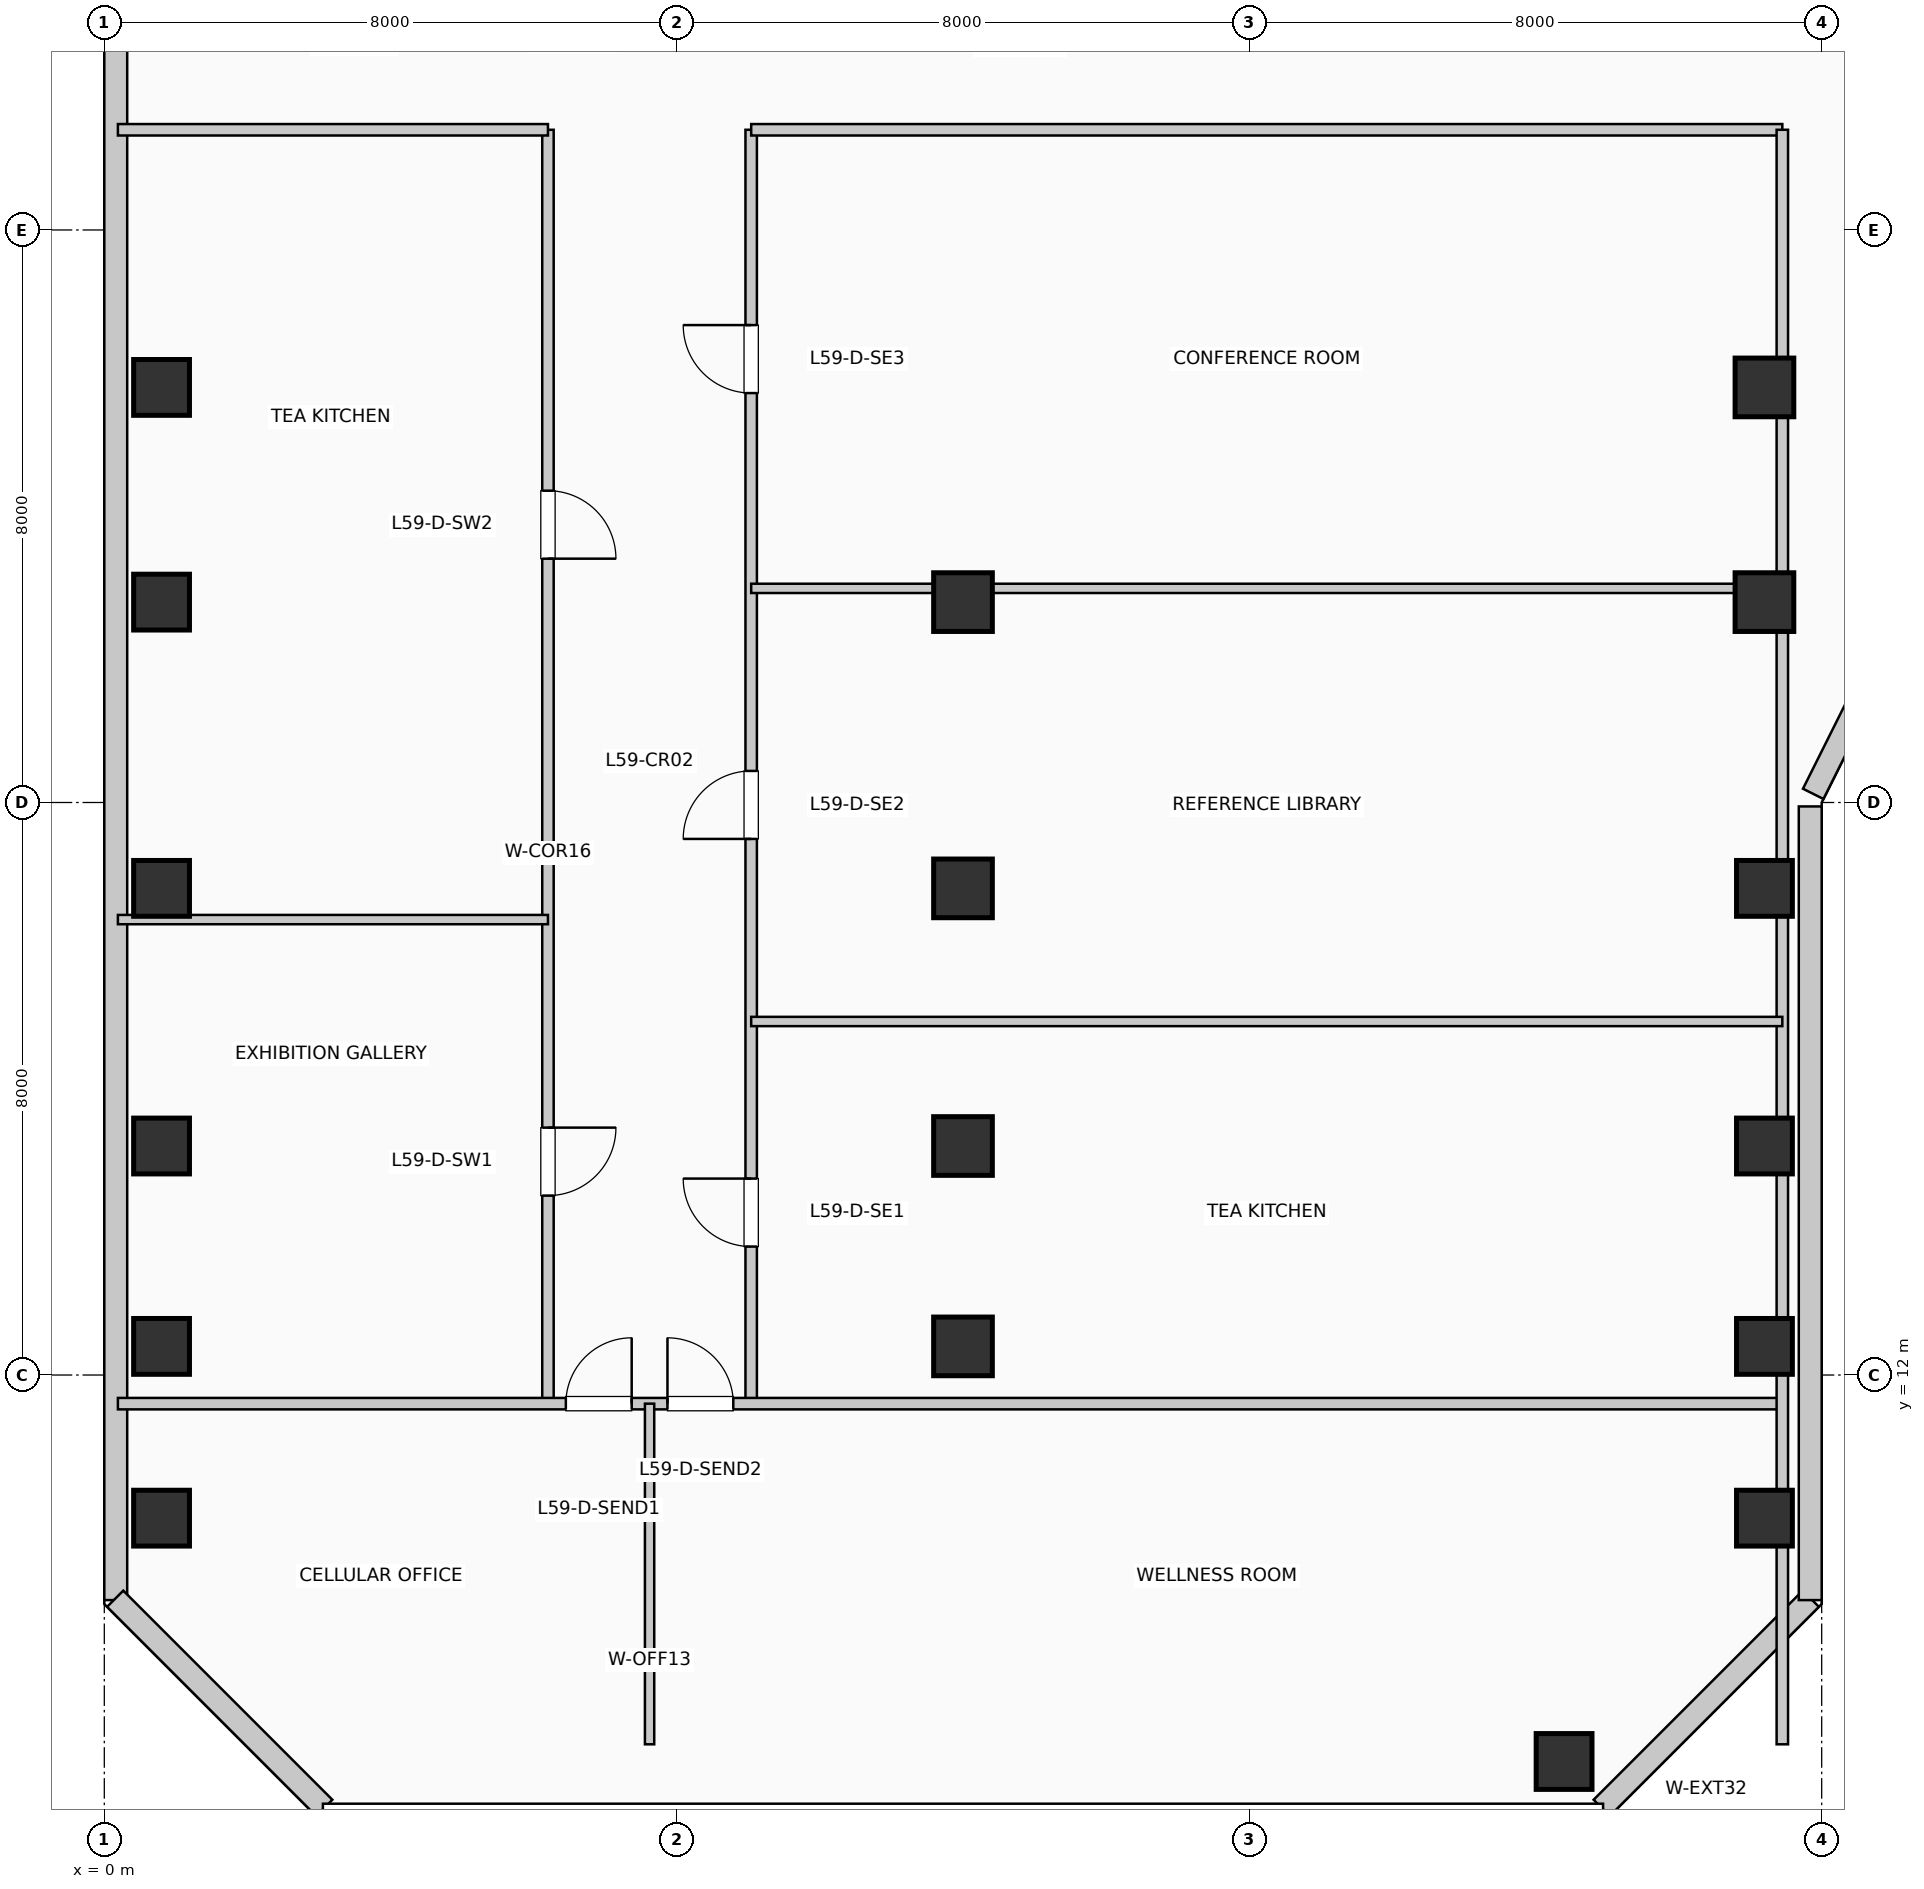
"""IFC4 building model, lengths in metres.
Left out: names, types, materials, properties, quantities, classifications, styles, units other than length and angle.
Written with IfcOpenShell. Run it as: python <this file> out.ifc"""

import sys

from ifc_helpers import new_model, si_unit, direction, frame, frame_2d, origin, origin_2d, place, context, subcontext, project, spatial, rectangle, extrude, element, fill, save


model = new_model("IFC4")
c1 = context("Model", 3, precision=1e-05, world=origin(), true_north=direction((0.0, 1.0)))
c2 = subcontext(c1, "Body", "Model", "MODEL_VIEW")
j1 = project(units=[si_unit("LENGTHUNIT", "METRE"), si_unit("PLANEANGLEUNIT", "RADIAN")], contexts=[c1])
p1 = place(None, origin())
s1 = spatial("IfcSite", under=j1, at=p1, CompositionType="ELEMENT")
p2 = place(p1, origin())
s2 = spatial("IfcBuilding", under=s1, at=p2, CompositionType="ELEMENT")
p3 = place(p2, frame((0.0, 0.0, 243.54)))
s3 = spatial("IfcBuildingStorey", under=s2, at=p3, CompositionType="ELEMENT", Elevation=243.54)
for number, where, z_axis, x_axis in (
    (1, (0.8, 10.0, 0.0), (0.0, 0.0, 1.0), (1.0, 0.0, 0.0)),
    (2, (0.8, 12.4, 0.0), (0.0, 0.0, 1.0), (1.0, 0.0, 0.0)),
    (3, (0.8, 15.2, 0.0), (0.0, 0.0, 1.0), (1.0, 0.0, 0.0)),
    (4, (0.8, 18.8, 0.0), (0.0, 0.0, 1.0), (1.0, 0.0, 0.0)),
    (5, (0.8, 22.8, 0.0), (0.0, 0.0, 1.0), (1.0, 0.0, 0.0)),
    (6, (0.8, 25.8, 0.0), (0.0, 0.0, 1.0), (1.0, 0.0, 0.0)),
):
    element("IfcColumn", number, at=place(p3, frame(where, z_axis=z_axis, x_axis=x_axis)), inside=s3, PredefinedType="COLUMN", context=c2, shape_type="SweptSolid", body=[
        extrude(rectangle(XDim=0.78, YDim=0.78, at=origin_2d()), origin(), (0.0, 0.0, 1.0), 3.96),
    ])
for number, where, z_axis, x_axis in (
    (7, (12.0, 12.4, 0.0), (0.0, 0.0, 1.0), (1.0, 0.0, 0.0)),
    (8, (12.0, 15.2, 0.0), (0.0, 0.0, 1.0), (1.0, 0.0, 0.0)),
    (9, (12.0, 18.8, 0.0), (0.0, 0.0, 1.0), (1.0, 0.0, 0.0)),
    (10, (12.0, 22.8, 0.0), (0.0, 0.0, 1.0), (1.0, 0.0, 0.0)),
):
    element("IfcColumn", number, at=place(p3, frame(where, z_axis=z_axis, x_axis=x_axis)), inside=s3, PredefinedType="COLUMN", context=c2, shape_type="SweptSolid", body=[
        extrude(rectangle(XDim=0.82, YDim=0.82, at=origin_2d()), origin(), (0.0, 0.0, 1.0), 3.96),
    ])
for number, where, z_axis, x_axis in (
    (11, (20.4, 6.6, 0.0), (0.0, 0.0, 1.0), (1.0, 0.0, 0.0)),
    (12, (23.2, 10.0, 0.0), (0.0, 0.0, 1.0), (1.0, 0.0, 0.0)),
    (13, (23.2, 12.4, 0.0), (0.0, 0.0, 1.0), (1.0, 0.0, 0.0)),
    (14, (23.2, 15.2, 0.0), (0.0, 0.0, 1.0), (1.0, 0.0, 0.0)),
    (15, (23.2, 18.8, 0.0), (0.0, 0.0, 1.0), (1.0, 0.0, 0.0)),
):
    element("IfcColumn", number, at=place(p3, frame(where, z_axis=z_axis, x_axis=x_axis)), inside=s3, PredefinedType="COLUMN", context=c2, shape_type="SweptSolid", body=[
        extrude(rectangle(XDim=0.78, YDim=0.78, at=origin_2d()), origin(), (0.0, 0.0, 1.0), 3.96),
    ])
for number, where, z_axis, x_axis in (
    (16, (23.2, 22.8, 0.0), (0.0, 0.0, 1.0), (1.0, 0.0, 0.0)),
    (17, (23.2, 25.8, 0.0), (0.0, 0.0, 1.0), (1.0, 0.0, 0.0)),
):
    element("IfcColumn", number, at=place(p3, frame(where, z_axis=z_axis, x_axis=x_axis)), inside=s3, PredefinedType="COLUMN", context=c2, shape_type="SweptSolid", body=[
        extrude(rectangle(XDim=0.82, YDim=0.82, at=origin_2d()), origin(), (0.0, 0.0, 1.0), 3.96),
    ])
p4 = place(p3, frame((20.926, 5.952, 0.0), z_axis=(0.0, 0.0, 1.0), x_axis=(0.707077242712, 0.707136318428, 0.0)))
e18 = element("IfcWall", 18, at=p4, inside=s3, PredefinedType="SOLIDWALL", context=c2, shape_type="SweptSolid", body=[
    extrude(rectangle(XDim=4.133, YDim=0.32, at=frame_2d((2.066, 0.0))), origin(), (0.0, 0.0, 1.0), 3.71),
])
p5 = place(p3, frame((23.84, 8.855, 0.0), z_axis=(0.0, 0.0, 1.0), x_axis=(0.0, 1.0, 0.0)))
e19 = element("IfcWall", 19, at=p5, inside=s3, PredefinedType="SOLIDWALL", context=c2, shape_type="SweptSolid", body=[
    extrude(rectangle(XDim=11.09, YDim=0.32, at=frame_2d((5.545, 0.0))), origin(), (0.0, 0.0, 1.0), 3.71),
])
p6 = place(p3, frame((23.882, 20.121, 0.0), z_axis=(0.0, 0.0, 1.0), x_axis=(0.447121734542, 0.894473115583, 0.0)))
e20 = element("IfcWall", 20, at=p6, inside=s3, PredefinedType="SOLIDWALL", context=c2, shape_type="SweptSolid", body=[
    extrude(rectangle(XDim=2.126, YDim=0.32, at=frame_2d((1.063, 0.0))), origin(), (0.0, 0.0, 1.0), 3.71),
])
p7 = place(p3, frame((0.16, 34.395, 0.0), z_axis=(0.0, 0.0, 1.0), x_axis=(0.0, -1.0, 0.0)))
e21 = element("IfcWall", 21, at=p7, inside=s3, PredefinedType="SOLIDWALL", context=c2, shape_type="SweptSolid", body=[
    extrude(rectangle(XDim=25.54, YDim=0.32, at=frame_2d((12.77, 0.0))), origin(), (0.0, 0.0, 1.0), 3.71),
])
p8 = place(p3, frame((0.152, 8.874, 0.0), z_axis=(0.0, 0.0, 1.0), x_axis=(0.707077242712, -0.707136318428, 0.0)))
e22 = element("IfcWall", 22, at=p8, inside=s3, PredefinedType="SOLIDWALL", context=c2, shape_type="SweptSolid", body=[
    extrude(rectangle(XDim=4.133, YDim=0.32, at=frame_2d((2.066, 0.0))), origin(), (0.0, 0.0, 1.0), 3.71),
])
p9 = place(p3, frame((6.2, 11.6, 0.0), z_axis=(0.0, 0.0, 1.0), x_axis=(0.0, 1.0, 0.0)))
e23 = element("IfcWall", 23, at=p9, inside=s3, PredefinedType="PARTITIONING", context=c2, shape_type="SweptSolid", body=[
    extrude(rectangle(XDim=17.8, YDim=0.16, at=frame_2d((8.9, 0.0))), origin(), (0.0, 0.0, 1.0), 3.71),
])
p10 = place(p9, frame((3.857, 0.0, 0.0), z_axis=(0.0, 0.0, 1.0), x_axis=(-1.0, 0.0, 0.0)))
e24 = element("IfcOpeningElement", 24, at=p10, cuts=e23, PredefinedType="OPENING", context=c2, shape_type="SweptSolid", body=[
    extrude(rectangle(XDim=0.95, YDim=2.15, at=frame_2d((0.475, 1.075))), frame((0.0, 0.09, 0.0), z_axis=(0.0, -1.0, 0.0), x_axis=(1.0, 0.0, 0.0)), (0.0, 0.0, 1.0), 0.18),
])
p11 = place(p9, frame((12.757, 0.0, 0.0), z_axis=(0.0, 0.0, 1.0), x_axis=(-1.0, 0.0, 0.0)))
e25 = element("IfcOpeningElement", 25, at=p11, cuts=e23, PredefinedType="OPENING", context=c2, shape_type="SweptSolid", body=[
    extrude(rectangle(XDim=0.95, YDim=2.15, at=frame_2d((0.475, 1.075))), frame((0.0, 0.09, 0.0), z_axis=(0.0, -1.0, 0.0), x_axis=(1.0, 0.0, 0.0)), (0.0, 0.0, 1.0), 0.18),
])
p12 = place(p3, frame((9.04, 11.6, 0.0), z_axis=(0.0, 0.0, 1.0), x_axis=(0.0, 1.0, 0.0)))
e26 = element("IfcWall", 26, at=p12, inside=s3, PredefinedType="PARTITIONING", context=c2, shape_type="SweptSolid", body=[
    extrude(rectangle(XDim=17.8, YDim=0.16, at=frame_2d((8.9, 0.0))), origin(), (0.0, 0.0, 1.0), 3.71),
])
p13 = place(p12, frame((2.195, 0.0, 0.0)))
e27 = element("IfcOpeningElement", 27, at=p13, cuts=e26, PredefinedType="OPENING", context=c2, shape_type="SweptSolid", body=[
    extrude(rectangle(XDim=0.95, YDim=2.15, at=frame_2d((0.475, 1.075))), frame((0.0, 0.09, 0.0), z_axis=(0.0, -1.0, 0.0), x_axis=(1.0, 0.0, 0.0)), (0.0, 0.0, 1.0), 0.18),
])
p14 = place(p12, frame((7.891, 0.0, 0.0)))
e28 = element("IfcOpeningElement", 28, at=p14, cuts=e26, PredefinedType="OPENING", context=c2, shape_type="SweptSolid", body=[
    extrude(rectangle(XDim=0.95, YDim=2.15, at=frame_2d((0.475, 1.075))), frame((0.0, 0.09, 0.0), z_axis=(0.0, -1.0, 0.0), x_axis=(1.0, 0.0, 0.0)), (0.0, 0.0, 1.0), 0.18),
])
p15 = place(p12, frame((14.121, 0.0, 0.0)))
e29 = element("IfcOpeningElement", 29, at=p15, cuts=e26, PredefinedType="OPENING", context=c2, shape_type="SweptSolid", body=[
    extrude(rectangle(XDim=0.95, YDim=2.15, at=frame_2d((0.475, 1.075))), frame((0.0, 0.09, 0.0), z_axis=(0.0, -1.0, 0.0), x_axis=(1.0, 0.0, 0.0)), (0.0, 0.0, 1.0), 0.18),
])
p16 = place(p3, frame((0.19, 11.6, 0.0), z_axis=(0.0, 0.0, 1.0), x_axis=(1.0, 0.0, 0.0)))
e30 = element("IfcWall", 30, at=p16, inside=s3, PredefinedType="PARTITIONING", context=c2, shape_type="SweptSolid", body=[
    extrude(rectangle(XDim=23.26, YDim=0.16, at=frame_2d((11.63, 0.0))), origin(), (0.0, 0.0, 1.0), 3.71),
])
p17 = place(p16, frame((6.26, 0.0, 0.0)))
e31 = element("IfcOpeningElement", 31, at=p17, cuts=e30, PredefinedType="OPENING", context=c2, shape_type="SweptSolid", body=[
    extrude(rectangle(XDim=0.92, YDim=2.1, at=frame_2d((0.46, 1.05))), frame((0.0, 0.09, 0.0), z_axis=(0.0, -1.0, 0.0), x_axis=(1.0, 0.0, 0.0)), (0.0, 0.0, 1.0), 0.18),
])
p18 = place(p16, frame((7.68, 0.0, 0.0)))
e32 = element("IfcOpeningElement", 32, at=p18, cuts=e30, PredefinedType="OPENING", context=c2, shape_type="SweptSolid", body=[
    extrude(rectangle(XDim=0.92, YDim=2.1, at=frame_2d((0.46, 1.05))), frame((0.0, 0.09, 0.0), z_axis=(0.0, -1.0, 0.0), x_axis=(1.0, 0.0, 0.0)), (0.0, 0.0, 1.0), 0.18),
])
p19 = place(p3, frame((0.19, 29.4, 0.0), z_axis=(0.0, 0.0, 1.0), x_axis=(1.0, 0.0, 0.0)))
e33 = element("IfcWall", 33, at=p19, inside=s3, PredefinedType="PARTITIONING", context=c2, shape_type="SweptSolid", body=[
    extrude(rectangle(XDim=6.01, YDim=0.16, at=frame_2d((3.005, 0.0))), origin(), (0.0, 0.0, 1.0), 3.365),
])
p20 = place(p3, frame((9.04, 29.4, 0.0), z_axis=(0.0, 0.0, 1.0), x_axis=(1.0, 0.0, 0.0)))
e34 = element("IfcWall", 34, at=p20, inside=s3, PredefinedType="PARTITIONING", context=c2, shape_type="SweptSolid", body=[
    extrude(rectangle(XDim=14.41, YDim=0.16, at=frame_2d((7.205, 0.0))), origin(), (0.0, 0.0, 1.0), 3.365),
])
p21 = place(p3, frame((23.45, 6.84, 0.0), z_axis=(0.0, 0.0, 1.0), x_axis=(0.0, 1.0, 0.0)))
e35 = element("IfcWall", 35, at=p21, inside=s3, PredefinedType="PARTITIONING", context=c2, shape_type="SweptSolid", body=[
    extrude(rectangle(XDim=22.56, YDim=0.16, at=frame_2d((11.28, 0.0))), origin(), (0.0, 0.0, 1.0), 3.095),
])
p22 = place(p3, frame((7.62, 6.84, 0.0), z_axis=(0.0, 0.0, 1.0), x_axis=(0.0, 1.0, 0.0)))
e36 = element("IfcWall", 36, at=p22, inside=s3, PredefinedType="PARTITIONING", context=c2, shape_type="SweptSolid", body=[
    extrude(rectangle(XDim=4.76, YDim=0.13, at=frame_2d((2.38, 0.0))), origin(), (0.0, 0.0, 1.0), 3.71),
])
p23 = place(p3, frame((0.19, 18.364, 0.0), z_axis=(0.0, 0.0, 1.0), x_axis=(1.0, 0.0, 0.0)))
e37 = element("IfcWall", 37, at=p23, inside=s3, PredefinedType="PARTITIONING", context=c2, shape_type="SweptSolid", body=[
    extrude(rectangle(XDim=6.01, YDim=0.13, at=frame_2d((3.005, 0.0))), origin(), (0.0, 0.0, 1.0), 3.095),
])
p24 = place(p3, frame((9.04, 16.94, 0.0), z_axis=(0.0, 0.0, 1.0), x_axis=(1.0, 0.0, 0.0)))
e38 = element("IfcWall", 38, at=p24, inside=s3, PredefinedType="PARTITIONING", context=c2, shape_type="SweptSolid", body=[
    extrude(rectangle(XDim=14.41, YDim=0.13, at=frame_2d((7.205, 0.0))), origin(), (0.0, 0.0, 1.0), 3.71),
])
p25 = place(p3, frame((9.04, 22.992, 0.0), z_axis=(0.0, 0.0, 1.0), x_axis=(1.0, 0.0, 0.0)))
e39 = element("IfcWall", 39, at=p25, inside=s3, PredefinedType="PARTITIONING", context=c2, shape_type="SweptSolid", body=[
    extrude(rectangle(XDim=14.41, YDim=0.13, at=frame_2d((7.205, 0.0))), origin(), (0.0, 0.0, 1.0), 3.095),
])
p26 = place(p17, origin())
e40 = element("IfcDoor", 40, at=p26, inside=s3, OperationType="SINGLE_SWING_RIGHT", PredefinedType="DOOR", context=c2, shape_type="SweptSolid", body=[
    extrude(rectangle(XDim=0.92, YDim=2.1, at=frame_2d((0.46, 1.05))), frame((0.0, 0.025, 0.0), z_axis=(0.0, -1.0, 0.0), x_axis=(1.0, 0.0, 0.0)), (0.0, 0.0, 1.0), 0.05),
])
fill(e31, e40)
p27 = place(p18, origin())
e41 = element("IfcDoor", 41, at=p27, inside=s3, OperationType="SINGLE_SWING_LEFT", PredefinedType="DOOR", context=c2, shape_type="SweptSolid", body=[
    extrude(rectangle(XDim=0.92, YDim=2.1, at=frame_2d((0.46, 1.05))), frame((0.0, 0.025, 0.0), z_axis=(0.0, -1.0, 0.0), x_axis=(1.0, 0.0, 0.0)), (0.0, 0.0, 1.0), 0.05),
])
fill(e32, e41)
p28 = place(p10, origin())
e42 = element("IfcDoor", 42, at=p28, inside=s3, OperationType="SINGLE_SWING_RIGHT", PredefinedType="DOOR", context=c2, shape_type="SweptSolid", body=[
    extrude(rectangle(XDim=0.95, YDim=2.15, at=frame_2d((0.475, 1.075))), frame((0.0, 0.025, 0.0), z_axis=(0.0, -1.0, 0.0), x_axis=(1.0, 0.0, 0.0)), (0.0, 0.0, 1.0), 0.05),
])
fill(e24, e42)
p29 = place(p11, origin())
e43 = element("IfcDoor", 43, at=p29, inside=s3, OperationType="SINGLE_SWING_LEFT", PredefinedType="DOOR", context=c2, shape_type="SweptSolid", body=[
    extrude(rectangle(XDim=0.95, YDim=2.15, at=frame_2d((0.475, 1.075))), frame((0.0, 0.025, 0.0), z_axis=(0.0, -1.0, 0.0), x_axis=(1.0, 0.0, 0.0)), (0.0, 0.0, 1.0), 0.05),
])
fill(e25, e43)
p30 = place(p13, origin())
e44 = element("IfcDoor", 44, at=p30, inside=s3, OperationType="SINGLE_SWING_RIGHT", PredefinedType="DOOR", context=c2, shape_type="SweptSolid", body=[
    extrude(rectangle(XDim=0.95, YDim=2.15, at=frame_2d((0.475, 1.075))), frame((0.0, 0.025, 0.0), z_axis=(0.0, -1.0, 0.0), x_axis=(1.0, 0.0, 0.0)), (0.0, 0.0, 1.0), 0.05),
])
fill(e27, e44)
p31 = place(p14, origin())
e45 = element("IfcDoor", 45, at=p31, inside=s3, OperationType="SINGLE_SWING_LEFT", PredefinedType="DOOR", context=c2, shape_type="SweptSolid", body=[
    extrude(rectangle(XDim=0.95, YDim=2.15, at=frame_2d((0.475, 1.075))), frame((0.0, 0.025, 0.0), z_axis=(0.0, -1.0, 0.0), x_axis=(1.0, 0.0, 0.0)), (0.0, 0.0, 1.0), 0.05),
])
fill(e28, e45)
p32 = place(p15, origin())
e46 = element("IfcDoor", 46, at=p32, inside=s3, OperationType="SINGLE_SWING_RIGHT", PredefinedType="DOOR", context=c2, shape_type="SweptSolid", body=[
    extrude(rectangle(XDim=0.95, YDim=2.15, at=frame_2d((0.475, 1.075))), frame((0.0, 0.025, 0.0), z_axis=(0.0, -1.0, 0.0), x_axis=(1.0, 0.0, 0.0)), (0.0, 0.0, 1.0), 0.05),
])
fill(e29, e46)
save(model, sys.argv[1])
